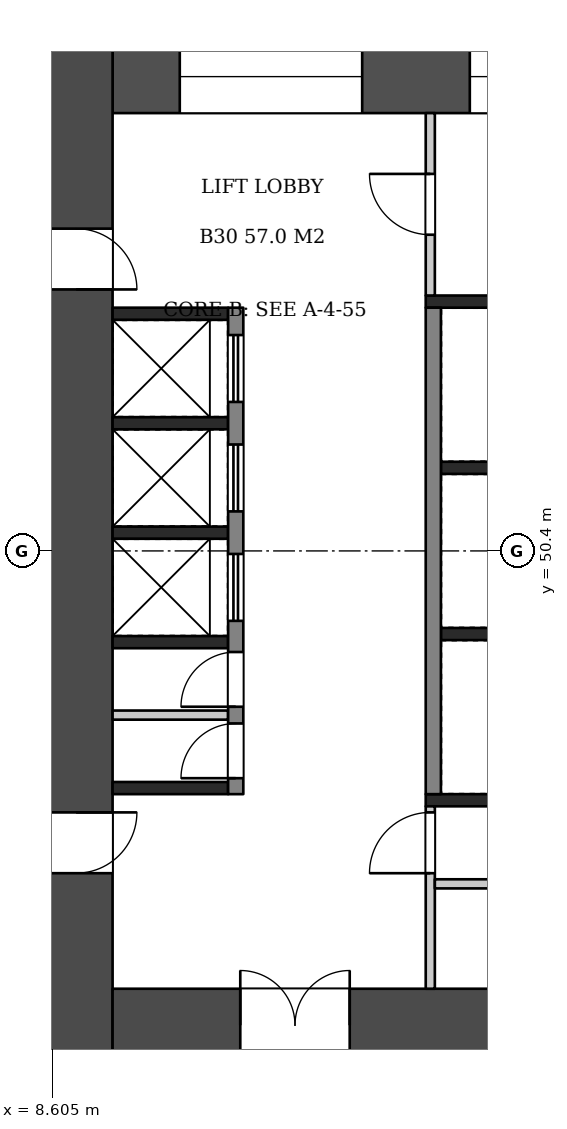
"""IFC4 building model, lengths in metres.
Left out: names, types, materials, properties, quantities, classifications, styles, units other than length and angle.
Written with IfcOpenShell. Run it as: python <this file> out.ifc"""

import sys

from ifc_helpers import new_model, si_unit, direction, frame, frame_2d, origin, place, context, subcontext, project, spatial, rectangle, extrude, element, fill, save


model = new_model("IFC4")
c1 = context("Model", 3, precision=1e-05, world=origin(), true_north=direction((0.0, 1.0)))
c2 = subcontext(c1, "Body", "Model", "MODEL_VIEW")
j1 = project(units=[si_unit("LENGTHUNIT", "METRE"), si_unit("PLANEANGLEUNIT", "RADIAN")], contexts=[c1])
p1 = place(None, origin())
s1 = spatial("IfcSite", under=j1, at=p1, CompositionType="ELEMENT")
p2 = place(p1, origin())
s2 = spatial("IfcBuilding", under=s1, at=p2, CompositionType="ELEMENT")
p3 = place(p2, frame((0.0, 0.0, 119.7)))
s3 = spatial("IfcBuildingStorey", under=s2, at=p3, CompositionType="ELEMENT", Elevation=119.7)
p4 = place(p3, frame((9.0, 58.8, 0.0), z_axis=(0.0, 0.0, 1.0), x_axis=(0.0, -1.0, 0.0)))
e1 = element("IfcWall", 1, at=p4, inside=s3, PredefinedType="SHEAR", context=c2, shape_type="SweptSolid", body=[
    extrude(rectangle(XDim=16.8, YDim=1.2, at=frame_2d((8.4, 0.0))), origin(), (0.0, 0.0, 1.0), 3.22),
])
p5 = place(p4, frame((3.1, 0.0, 0.0)))
e2 = element("IfcOpeningElement", 2, at=p5, cuts=e1, PredefinedType="OPENING", context=c2, shape_type="SweptSolid", body=[
    extrude(rectangle(XDim=1.0, YDim=2.1, at=frame_2d((0.5, 1.05))), frame((0.0, 0.61, 0.0), z_axis=(0.0, -1.0, 0.0), x_axis=(1.0, 0.0, 0.0)), (0.0, 0.0, 1.0), 1.22),
])
p6 = place(p4, frame((12.7, 0.0, 0.0)))
e3 = element("IfcOpeningElement", 3, at=p6, cuts=e1, PredefinedType="OPENING", context=c2, shape_type="SweptSolid", body=[
    extrude(rectangle(XDim=1.0, YDim=2.1, at=frame_2d((0.5, 1.05))), frame((0.0, 0.61, 0.0), z_axis=(0.0, -1.0, 0.0), x_axis=(1.0, 0.0, 0.0)), (0.0, 0.0, 1.0), 1.22),
])
p7 = place(p3, frame((9.6, 58.2, 0.0), z_axis=(0.0, 0.0, 1.0), x_axis=(1.0, 0.0, 0.0)))
e4 = element("IfcWall", 4, at=p7, inside=s3, PredefinedType="SHEAR", context=c2, shape_type="SweptSolid", body=[
    extrude(rectangle(XDim=14.4, YDim=1.2, at=frame_2d((7.2, 0.0))), origin(), (0.0, 0.0, 1.0), 3.22),
])
p8 = place(p7, frame((1.105, 0.0, 0.6)))
e5 = element("IfcOpeningElement", 5, at=p8, cuts=e4, PredefinedType="OPENING", context=c2, shape_type="SweptSolid", body=[
    extrude(rectangle(XDim=3.0, YDim=2.1, at=frame_2d((1.5, 1.05))), frame((0.0, 0.61, 0.0), z_axis=(0.0, -1.0, 0.0), x_axis=(1.0, 0.0, 0.0)), (0.0, 0.0, 1.0), 1.22),
])
p9 = place(p7, frame((5.875, 0.0, 0.6)))
e6 = element("IfcOpeningElement", 6, at=p9, cuts=e4, PredefinedType="OPENING", context=c2, shape_type="SweptSolid", body=[
    extrude(rectangle(XDim=2.4, YDim=2.1, at=frame_2d((1.2, 1.05))), frame((0.0, 0.61, 0.0), z_axis=(0.0, -1.0, 0.0), x_axis=(1.0, 0.0, 0.0)), (0.0, 0.0, 1.0), 1.22),
])
p10 = place(p7, frame((9.993, 0.0, 0.5)))
e7 = element("IfcOpeningElement", 7, at=p10, cuts=e4, PredefinedType="OPENING", context=c2, shape_type="SweptSolid", body=[
    extrude(rectangle(XDim=1.2, YDim=2.4, at=frame_2d((0.6, 1.2))), frame((0.0, 0.61, 0.0), z_axis=(0.0, -1.0, 0.0), x_axis=(1.0, 0.0, 0.0)), (0.0, 0.0, 1.0), 1.22),
])
p11 = place(p7, frame((12.197, 0.0, 0.5)))
e8 = element("IfcOpeningElement", 8, at=p11, cuts=e4, PredefinedType="OPENING", context=c2, shape_type="SweptSolid", body=[
    extrude(rectangle(XDim=1.2, YDim=2.4, at=frame_2d((0.6, 1.2))), frame((0.0, 0.61, 0.0), z_axis=(0.0, -1.0, 0.0), x_axis=(1.0, 0.0, 0.0)), (0.0, 0.0, 1.0), 1.22),
])
p12 = place(p3, frame((9.6, 42.6, 0.0), z_axis=(0.0, 0.0, 1.0), x_axis=(1.0, 0.0, 0.0)))
e9 = element("IfcWall", 9, at=p12, inside=s3, PredefinedType="SHEAR", context=c2, shape_type="SweptSolid", body=[
    extrude(rectangle(XDim=14.4, YDim=1.2, at=frame_2d((7.2, 0.0))), origin(), (0.0, 0.0, 1.0), 3.22),
])
p13 = place(p12, frame((2.1, 0.0, 0.0)))
e10 = element("IfcOpeningElement", 10, at=p13, cuts=e9, PredefinedType="OPENING", context=c2, shape_type="SweptSolid", body=[
    extrude(rectangle(XDim=1.8, YDim=2.1, at=frame_2d((0.9, 1.05))), frame((0.0, 0.61, 0.0), z_axis=(0.0, -1.0, 0.0), x_axis=(1.0, 0.0, 0.0)), (0.0, 0.0, 1.0), 1.22),
])
for number, where, z_axis, x_axis in (
    (11, (9.6, 54.3, 0.0), (0.0, 0.0, 1.0), (1.0, 0.0, 0.0)),
    (12, (9.6, 52.5, 0.0), (0.0, 0.0, 1.0), (1.0, 0.0, 0.0)),
    (13, (9.6, 50.7, 0.0), (0.0, 0.0, 1.0), (1.0, 0.0, 0.0)),
    (14, (9.6, 48.9, 0.0), (0.0, 0.0, 1.0), (1.0, 0.0, 0.0)),
    (15, (9.6, 46.5, 0.0), (0.0, 0.0, 1.0), (1.0, 0.0, 0.0)),
):
    element("IfcWall", number, at=place(p3, frame(where, z_axis=z_axis, x_axis=x_axis)), inside=s3, PredefinedType="SHEAR", context=c2, shape_type="SweptSolid", body=[
        extrude(rectangle(XDim=1.9, YDim=0.2, at=frame_2d((0.95, 0.0))), origin(), (0.0, 0.0, 1.0), 3.22),
    ])
p14 = place(p3, frame((9.6, 47.7, 0.0), z_axis=(0.0, 0.0, 1.0), x_axis=(1.0, 0.0, 0.0)))
e16 = element("IfcWall", 16, at=p14, inside=s3, PredefinedType="PARTITIONING", context=c2, shape_type="SweptSolid", body=[
    extrude(rectangle(XDim=1.9, YDim=0.15, at=frame_2d((0.95, 0.0))), origin(), (0.0, 0.0, 1.0), 3.22),
])
p15 = place(p3, frame((11.625, 54.4, 0.0), z_axis=(0.0, 0.0, 1.0), x_axis=(0.0, -1.0, 0.0)))
e17 = element("IfcWall", 17, at=p15, inside=s3, PredefinedType="SHEAR", context=c2, shape_type="SweptSolid", body=[
    extrude(rectangle(XDim=8.0, YDim=0.25, at=frame_2d((4.0, 0.0))), origin(), (0.0, 0.0, 1.0), 3.22),
])
p16 = place(p15, frame((0.45, 0.0, 0.0)))
e18 = element("IfcOpeningElement", 18, at=p16, cuts=e17, PredefinedType="OPENING", context=c2, shape_type="SweptSolid", body=[
    extrude(rectangle(XDim=1.1, YDim=2.1, at=frame_2d((0.55, 1.05))), frame((0.0, 0.135, 0.0), z_axis=(0.0, -1.0, 0.0), x_axis=(1.0, 0.0, 0.0)), (0.0, 0.0, 1.0), 0.27),
])
p17 = place(p15, frame((2.25, 0.0, 0.0)))
e19 = element("IfcOpeningElement", 19, at=p17, cuts=e17, PredefinedType="OPENING", context=c2, shape_type="SweptSolid", body=[
    extrude(rectangle(XDim=1.1, YDim=2.1, at=frame_2d((0.55, 1.05))), frame((0.0, 0.135, 0.0), z_axis=(0.0, -1.0, 0.0), x_axis=(1.0, 0.0, 0.0)), (0.0, 0.0, 1.0), 0.27),
])
p18 = place(p15, frame((4.05, 0.0, 0.0)))
e20 = element("IfcOpeningElement", 20, at=p18, cuts=e17, PredefinedType="OPENING", context=c2, shape_type="SweptSolid", body=[
    extrude(rectangle(XDim=1.1, YDim=2.1, at=frame_2d((0.55, 1.05))), frame((0.0, 0.135, 0.0), z_axis=(0.0, -1.0, 0.0), x_axis=(1.0, 0.0, 0.0)), (0.0, 0.0, 1.0), 0.27),
])
p19 = place(p15, frame((5.663, 0.0, 0.0)))
e21 = element("IfcOpeningElement", 21, at=p19, cuts=e17, PredefinedType="OPENING", context=c2, shape_type="SweptSolid", body=[
    extrude(rectangle(XDim=0.9, YDim=2.1, at=frame_2d((0.45, 1.05))), frame((0.0, 0.135, 0.0), z_axis=(0.0, -1.0, 0.0), x_axis=(1.0, 0.0, 0.0)), (0.0, 0.0, 1.0), 0.27),
])
p20 = place(p15, frame((6.837, 0.0, 0.0)))
e22 = element("IfcOpeningElement", 22, at=p20, cuts=e17, PredefinedType="OPENING", context=c2, shape_type="SweptSolid", body=[
    extrude(rectangle(XDim=0.9, YDim=2.1, at=frame_2d((0.45, 1.05))), frame((0.0, 0.135, 0.0), z_axis=(0.0, -1.0, 0.0), x_axis=(1.0, 0.0, 0.0)), (0.0, 0.0, 1.0), 0.27),
])
for number, where, z_axis, x_axis in (
    (23, (15.0, 51.767, 0.0), (0.0, 0.0, 1.0), (1.0, 0.0, 0.0)),
    (24, (15.0, 49.033, 0.0), (0.0, 0.0, 1.0), (1.0, 0.0, 0.0)),
):
    element("IfcWall", number, at=place(p3, frame(where, z_axis=z_axis, x_axis=x_axis)), inside=s3, PredefinedType="SHEAR", context=c2, shape_type="SweptSolid", body=[
        extrude(rectangle(XDim=1.9, YDim=0.2, at=frame_2d((0.95, 0.0))), origin(), (0.0, 0.0, 1.0), 3.22),
    ])
p21 = place(p3, frame((14.875, 54.4, 0.0), z_axis=(0.0, 0.0, 1.0), x_axis=(0.0, -1.0, 0.0)))
e25 = element("IfcWall", 25, at=p21, inside=s3, PredefinedType="SHEAR", context=c2, shape_type="SweptSolid", body=[
    extrude(rectangle(XDim=8.0, YDim=0.25, at=frame_2d((4.0, 0.0))), origin(), (0.0, 0.0, 1.0), 3.22),
])
p22 = place(p3, frame((14.75, 54.5, 0.0), z_axis=(0.0, 0.0, 1.0), x_axis=(1.0, 0.0, 0.0)))
e26 = element("IfcWall", 26, at=p22, inside=s3, PredefinedType="SHEAR", context=c2, shape_type="SweptSolid", body=[
    extrude(rectangle(XDim=2.4, YDim=0.2, at=frame_2d((1.2, 0.0))), origin(), (0.0, 0.0, 1.0), 3.22),
])
p23 = place(p3, frame((14.825, 57.6, 0.0), z_axis=(0.0, 0.0, 1.0), x_axis=(0.0, -1.0, 0.0)))
e27 = element("IfcWall", 27, at=p23, inside=s3, PredefinedType="PARTITIONING", context=c2, shape_type="SweptSolid", body=[
    extrude(rectangle(XDim=3.0, YDim=0.15, at=frame_2d((1.5, 0.0))), origin(), (0.0, 0.0, 1.0), 3.22),
])
p24 = place(p23, frame((1.0, 0.0, 0.0)))
e28 = element("IfcOpeningElement", 28, at=p24, cuts=e27, PredefinedType="OPENING", context=c2, shape_type="SweptSolid", body=[
    extrude(rectangle(XDim=1.0, YDim=2.1, at=frame_2d((0.5, 1.05))), frame((0.0, 0.085, 0.0), z_axis=(0.0, -1.0, 0.0), x_axis=(1.0, 0.0, 0.0)), (0.0, 0.0, 1.0), 0.17),
])
p25 = place(p3, frame((14.75, 46.3, 0.0), z_axis=(0.0, 0.0, 1.0), x_axis=(1.0, 0.0, 0.0)))
e29 = element("IfcWall", 29, at=p25, inside=s3, PredefinedType="SHEAR", context=c2, shape_type="SweptSolid", body=[
    extrude(rectangle(XDim=9.25, YDim=0.2, at=frame_2d((4.625, 0.0))), origin(), (0.0, 0.0, 1.0), 3.22),
])
p26 = place(p3, frame((14.825, 46.2, 0.0), z_axis=(0.0, 0.0, 1.0), x_axis=(0.0, -1.0, 0.0)))
e30 = element("IfcWall", 30, at=p26, inside=s3, PredefinedType="PARTITIONING", context=c2, shape_type="SweptSolid", body=[
    extrude(rectangle(XDim=3.0, YDim=0.15, at=frame_2d((1.5, 0.0))), origin(), (0.0, 0.0, 1.0), 3.22),
])
p27 = place(p26, frame((0.1, 0.0, 0.0)))
e31 = element("IfcOpeningElement", 31, at=p27, cuts=e30, PredefinedType="OPENING", context=c2, shape_type="SweptSolid", body=[
    extrude(rectangle(XDim=1.0, YDim=2.1, at=frame_2d((0.5, 1.05))), frame((0.0, 0.085, 0.0), z_axis=(0.0, -1.0, 0.0), x_axis=(1.0, 0.0, 0.0)), (0.0, 0.0, 1.0), 0.17),
])
p28 = place(p3, frame((14.9, 44.925, 0.0), z_axis=(0.0, 0.0, 1.0), x_axis=(1.0, 0.0, 0.0)))
e32 = element("IfcWall", 32, at=p28, inside=s3, PredefinedType="PARTITIONING", context=c2, shape_type="SweptSolid", body=[
    extrude(rectangle(XDim=9.1, YDim=0.15, at=frame_2d((4.55, 0.0))), origin(), (0.0, 0.0, 1.0), 3.22),
])
p29 = place(p28, frame((1.09, 0.0, 0.0)))
e33 = element("IfcOpeningElement", 33, at=p29, cuts=e32, PredefinedType="OPENING", context=c2, shape_type="SweptSolid", body=[
    extrude(rectangle(XDim=0.9, YDim=2.1, at=frame_2d((0.45, 1.05))), frame((0.0, 0.085, 0.0), z_axis=(0.0, -1.0, 0.0), x_axis=(1.0, 0.0, 0.0)), (0.0, 0.0, 1.0), 0.17),
])
p30 = place(p28, frame((4.32, 0.0, 0.0)))
e34 = element("IfcOpeningElement", 34, at=p30, cuts=e32, PredefinedType="OPENING", context=c2, shape_type="SweptSolid", body=[
    extrude(rectangle(XDim=0.9, YDim=2.1, at=frame_2d((0.45, 1.05))), frame((0.0, 0.085, 0.0), z_axis=(0.0, -1.0, 0.0), x_axis=(1.0, 0.0, 0.0)), (0.0, 0.0, 1.0), 0.17),
])
p31 = place(p28, frame((7.33, 0.0, 0.0)))
e35 = element("IfcOpeningElement", 35, at=p31, cuts=e32, PredefinedType="OPENING", context=c2, shape_type="SweptSolid", body=[
    extrude(rectangle(XDim=0.9, YDim=2.1, at=frame_2d((0.45, 1.05))), frame((0.0, 0.085, 0.0), z_axis=(0.0, -1.0, 0.0), x_axis=(1.0, 0.0, 0.0)), (0.0, 0.0, 1.0), 0.17),
])
p32 = place(p5, origin())
e36 = element("IfcDoor", 36, at=p32, inside=s3, OperationType="SINGLE_SWING_RIGHT", PredefinedType="DOOR", context=c2, shape_type="SweptSolid", body=[
    extrude(rectangle(XDim=1.0, YDim=2.1, at=frame_2d((0.5, 1.05))), frame((0.0, 0.025, 0.0), z_axis=(0.0, -1.0, 0.0), x_axis=(1.0, 0.0, 0.0)), (0.0, 0.0, 1.0), 0.05),
])
fill(e2, e36)
p33 = place(p6, origin())
e37 = element("IfcDoor", 37, at=p33, inside=s3, OperationType="SINGLE_SWING_LEFT", PredefinedType="DOOR", context=c2, shape_type="SweptSolid", body=[
    extrude(rectangle(XDim=1.0, YDim=2.1, at=frame_2d((0.5, 1.05))), frame((0.0, 0.025, 0.0), z_axis=(0.0, -1.0, 0.0), x_axis=(1.0, 0.0, 0.0)), (0.0, 0.0, 1.0), 0.05),
])
fill(e3, e37)
p34 = place(p13, origin())
e38 = element("IfcDoor", 38, at=p34, inside=s3, OperationType="DOUBLE_DOOR_SINGLE_SWING", PredefinedType="DOOR", context=c2, shape_type="SweptSolid", body=[
    extrude(rectangle(XDim=1.8, YDim=2.1, at=frame_2d((0.9, 1.05))), frame((0.0, 0.025, 0.0), z_axis=(0.0, -1.0, 0.0), x_axis=(1.0, 0.0, 0.0)), (0.0, 0.0, 1.0), 0.05),
])
fill(e10, e38)
p35 = place(p16, origin())
e39 = element("IfcDoor", 39, at=p35, inside=s3, OperationType="DOUBLE_DOOR_SLIDING", PredefinedType="DOOR", context=c2, shape_type="SweptSolid", body=[
    extrude(rectangle(XDim=1.1, YDim=2.1, at=frame_2d((0.55, 1.05))), frame((0.0, 0.025, 0.0), z_axis=(0.0, -1.0, 0.0), x_axis=(1.0, 0.0, 0.0)), (0.0, 0.0, 1.0), 0.05),
])
fill(e18, e39)
p36 = place(p17, origin())
e40 = element("IfcDoor", 40, at=p36, inside=s3, OperationType="DOUBLE_DOOR_SLIDING", PredefinedType="DOOR", context=c2, shape_type="SweptSolid", body=[
    extrude(rectangle(XDim=1.1, YDim=2.1, at=frame_2d((0.55, 1.05))), frame((0.0, 0.025, 0.0), z_axis=(0.0, -1.0, 0.0), x_axis=(1.0, 0.0, 0.0)), (0.0, 0.0, 1.0), 0.05),
])
fill(e19, e40)
p37 = place(p18, origin())
e41 = element("IfcDoor", 41, at=p37, inside=s3, OperationType="DOUBLE_DOOR_SLIDING", PredefinedType="DOOR", context=c2, shape_type="SweptSolid", body=[
    extrude(rectangle(XDim=1.1, YDim=2.1, at=frame_2d((0.55, 1.05))), frame((0.0, 0.025, 0.0), z_axis=(0.0, -1.0, 0.0), x_axis=(1.0, 0.0, 0.0)), (0.0, 0.0, 1.0), 0.05),
])
fill(e20, e41)
p38 = place(p19, frame((0.9, 0.0, 0.0), z_axis=(0.0, 0.0, 1.0), x_axis=(-1.0, 0.0, 0.0)))
e42 = element("IfcDoor", 42, at=p38, inside=s3, OperationType="SINGLE_SWING_LEFT", PredefinedType="DOOR", context=c2, shape_type="SweptSolid", body=[
    extrude(rectangle(XDim=0.9, YDim=2.1, at=frame_2d((0.45, 1.05))), frame((0.0, 0.025, 0.0), z_axis=(0.0, -1.0, 0.0), x_axis=(1.0, 0.0, 0.0)), (0.0, 0.0, 1.0), 0.05),
])
fill(e21, e42)
p39 = place(p20, frame((0.9, 0.0, 0.0), z_axis=(0.0, 0.0, 1.0), x_axis=(-1.0, 0.0, 0.0)))
e43 = element("IfcDoor", 43, at=p39, inside=s3, OperationType="SINGLE_SWING_LEFT", PredefinedType="DOOR", context=c2, shape_type="SweptSolid", body=[
    extrude(rectangle(XDim=0.9, YDim=2.1, at=frame_2d((0.45, 1.05))), frame((0.0, 0.025, 0.0), z_axis=(0.0, -1.0, 0.0), x_axis=(1.0, 0.0, 0.0)), (0.0, 0.0, 1.0), 0.05),
])
fill(e22, e43)
p40 = place(p24, frame((1.0, 0.0, 0.0), z_axis=(0.0, 0.0, 1.0), x_axis=(-1.0, 0.0, 0.0)))
e44 = element("IfcDoor", 44, at=p40, inside=s3, OperationType="SINGLE_SWING_RIGHT", PredefinedType="DOOR", context=c2, shape_type="SweptSolid", body=[
    extrude(rectangle(XDim=1.0, YDim=2.1, at=frame_2d((0.5, 1.05))), frame((0.0, 0.025, 0.0), z_axis=(0.0, -1.0, 0.0), x_axis=(1.0, 0.0, 0.0)), (0.0, 0.0, 1.0), 0.05),
])
fill(e28, e44)
p41 = place(p27, frame((1.0, 0.0, 0.0), z_axis=(0.0, 0.0, 1.0), x_axis=(-1.0, 0.0, 0.0)))
e45 = element("IfcDoor", 45, at=p41, inside=s3, OperationType="SINGLE_SWING_LEFT", PredefinedType="DOOR", context=c2, shape_type="SweptSolid", body=[
    extrude(rectangle(XDim=1.0, YDim=2.1, at=frame_2d((0.5, 1.05))), frame((0.0, 0.025, 0.0), z_axis=(0.0, -1.0, 0.0), x_axis=(1.0, 0.0, 0.0)), (0.0, 0.0, 1.0), 0.05),
])
fill(e31, e45)
p42 = place(p8, origin())
e46 = element("IfcWindow", 46, at=p42, inside=s3, PartitioningType="SINGLE_PANEL", PredefinedType="WINDOW", context=c2, shape_type="SweptSolid", body=[
    extrude(rectangle(XDim=3.0, YDim=2.1, at=frame_2d((1.5, 1.05))), frame((0.0, 0.03, 0.0), z_axis=(0.0, -1.0, 0.0), x_axis=(1.0, 0.0, 0.0)), (0.0, 0.0, 1.0), 0.06),
])
fill(e5, e46)
p43 = place(p9, origin())
e47 = element("IfcWindow", 47, at=p43, inside=s3, PartitioningType="SINGLE_PANEL", PredefinedType="WINDOW", context=c2, shape_type="SweptSolid", body=[
    extrude(rectangle(XDim=2.4, YDim=2.1, at=frame_2d((1.2, 1.05))), frame((0.0, 0.03, 0.0), z_axis=(0.0, -1.0, 0.0), x_axis=(1.0, 0.0, 0.0)), (0.0, 0.0, 1.0), 0.06),
])
fill(e6, e47)
save(model, sys.argv[1])
